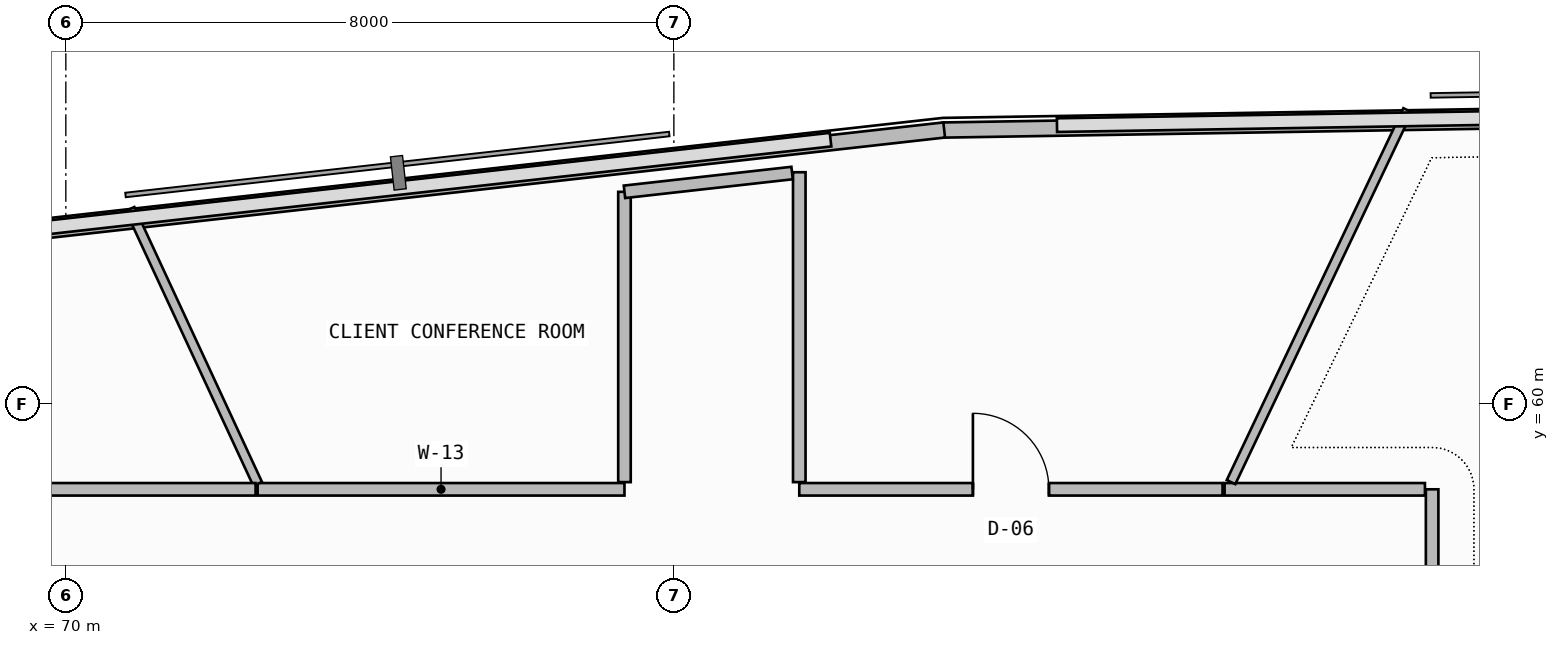
"""IFC4 building model, lengths in metres.
Left out: names, types, materials, properties, quantities, classifications, styles, units other than length and angle.
Written with IfcOpenShell. Run it as: python <this file> out.ifc"""

import sys

from ifc_helpers import new_model, si_unit, direction, frame, frame_2d, origin, place, context, subcontext, project, spatial, rectangle, extrude, element, fill, save


model = new_model("IFC4")
c1 = context("Model", 3, precision=1e-05, world=origin(), true_north=direction((0.0, 1.0)))
c2 = subcontext(c1, "Body", "Model", "MODEL_VIEW")
j1 = project(units=[si_unit("LENGTHUNIT", "METRE"), si_unit("PLANEANGLEUNIT", "RADIAN")], contexts=[c1])
p1 = place(None, origin())
s1 = spatial("IfcSite", under=j1, at=p1, CompositionType="ELEMENT")
p2 = place(p1, origin())
s2 = spatial("IfcBuilding", under=s1, at=p2, CompositionType="ELEMENT")
p3 = place(p2, frame((0.0, 0.0, 271.3)))
s3 = spatial("IfcBuildingStorey", under=s2, at=p3, CompositionType="ELEMENT", Elevation=271.3)
p4 = place(p3, frame((111.271, 64.092, 0.0), z_axis=(0.0, 0.0, 1.0), x_axis=(-0.999864741935, -0.016446818413, 0.0)))
e1 = element("IfcWall", 1, at=p4, inside=s3, PredefinedType="PARAPET", context=c2, shape_type="SweptSolid", body=[
    extrude(rectangle(XDim=29.733, YDim=0.2, at=frame_2d((14.866, 0.0))), origin(), (0.0, 0.0, 1.0), 1.15),
])
p5 = place(p3, frame((81.557, 63.604, 0.0), z_axis=(0.0, 0.0, 1.0), x_axis=(-0.993776455024, -0.111392806945, 0.0)))
e2 = element("IfcWall", 2, at=p5, inside=s3, PredefinedType="PARAPET", context=c2, shape_type="SweptSolid", body=[
    extrude(rectangle(XDim=24.891, YDim=0.2, at=frame_2d((12.446, 0.0))), origin(), (0.0, 0.0, 1.0), 1.15),
])
p6 = place(p3, frame((108.575, 58.067, 0.0), z_axis=(0.0, 0.0, 1.0), x_axis=(-0.923597614344, -0.383363335203, 0.0)))
e3 = element("IfcWall", 3, at=p6, inside=s3, PredefinedType="PARTITIONING", context=c2, shape_type="SweptSolid", body=[
    extrude(rectangle(XDim=22.201, YDim=0.125, at=frame_2d((11.101, 0.0))), origin(), (0.0, 0.0, 1.0), 2.645),
])
p7 = place(p3, frame((88.027, 51.309, 0.0), z_axis=(0.0, 0.0, 1.0), x_axis=(0.846577402355, 0.532265630885, 0.0)))
e4 = element("IfcWall", 4, at=p7, inside=s3, PredefinedType="PARTITIONING", context=c2, shape_type="SweptSolid", body=[
    extrude(rectangle(XDim=24.232, YDim=0.125, at=frame_2d((12.116, 0.0))), origin(), (0.0, 0.0, 1.0), 2.645),
])
p8 = place(p3, frame((87.976, 51.337, 0.0), z_axis=(0.0, 0.0, 1.0), x_axis=(0.0, 1.0, 0.0)))
e5 = element("IfcWall", 5, at=p8, inside=s3, PredefinedType="PARTITIONING", context=c2, shape_type="SweptSolid", body=[
    extrude(rectangle(XDim=7.539, YDim=0.165, at=frame_2d((3.77, 0.0))), origin(), (0.0, 0.0, 1.0), 2.745),
])
p9 = place(p8, frame((2.349, 0.0, 0.0)))
e6 = element("IfcOpeningElement", 6, at=p9, cuts=e5, PredefinedType="OPENING", context=c2, shape_type="SweptSolid", body=[
    extrude(rectangle(XDim=1.0, YDim=2.2, at=frame_2d((0.5, 1.1))), frame((0.0, 0.093, 0.0), z_axis=(0.0, -1.0, 0.0), x_axis=(1.0, 0.0, 0.0)), (0.0, 0.0, 1.0), 0.185),
])
p10 = place(p3, frame((87.882, 58.876, 0.0), z_axis=(0.0, 0.0, 1.0), x_axis=(-1.0, 0.0, 0.0)))
e7 = element("IfcWall", 7, at=p10, inside=s3, PredefinedType="PARTITIONING", context=c2, shape_type="SweptSolid", body=[
    extrude(rectangle(XDim=2.636, YDim=0.165, at=frame_2d((1.318, 0.0))), origin(), (0.0, 0.0, 1.0), 2.745),
])
p11 = place(p3, frame((85.331, 58.971, 0.0), z_axis=(0.0, 0.0, 1.0), x_axis=(0.429074283855, 0.903269206236, 0.0)))
e8 = element("IfcWall", 8, at=p11, inside=s3, PredefinedType="PARTITIONING", context=c2, shape_type="SweptSolid", body=[
    extrude(rectangle(XDim=5.416, YDim=0.125, at=frame_2d((2.708, 0.0))), origin(), (0.0, 0.0, 1.0), 3.26),
])
p12 = place(p3, frame((85.219, 58.876, 0.0), z_axis=(0.0, 0.0, 1.0), x_axis=(-1.0, 0.0, 0.0)))
e9 = element("IfcWall", 9, at=p12, inside=s3, PredefinedType="PARTITIONING", context=c2, shape_type="SweptSolid", body=[
    extrude(rectangle(XDim=5.569, YDim=0.165, at=frame_2d((2.785, 0.0))), origin(), (0.0, 0.0, 1.0), 3.26),
])
p13 = place(p12, frame((2.284, 0.0, 0.0)))
e10 = element("IfcOpeningElement", 10, at=p13, cuts=e9, PredefinedType="OPENING", context=c2, shape_type="SweptSolid", body=[
    extrude(rectangle(XDim=1.0, YDim=2.2, at=frame_2d((0.5, 1.1))), frame((0.0, 0.093, 0.0), z_axis=(0.0, -1.0, 0.0), x_axis=(1.0, 0.0, 0.0)), (0.0, 0.0, 1.0), 0.185),
])
p14 = place(p3, frame((77.35, 58.876, 0.0), z_axis=(0.0, 0.0, 1.0), x_axis=(-1.0, 0.0, 0.0)))
e11 = element("IfcWall", 11, at=p14, inside=s3, PredefinedType="PARTITIONING", context=c2, shape_type="SweptSolid", body=[
    extrude(rectangle(XDim=4.827, YDim=0.165, at=frame_2d((2.413, 0.0))), origin(), (0.0, 0.0, 1.0), 3.26),
])
p15 = place(p3, frame((79.65, 58.971, 0.0), z_axis=(0.0, 0.0, 1.0), x_axis=(0.0, 1.0, 0.0)))
e12 = element("IfcWall", 12, at=p15, inside=s3, PredefinedType="PARTITIONING", context=c2, shape_type="SweptSolid", body=[
    extrude(rectangle(XDim=4.077, YDim=0.165, at=frame_2d((2.039, 0.0))), origin(), (0.0, 0.0, 1.0), 3.26),
])
p16 = place(p3, frame((77.35, 62.79, 0.0), z_axis=(0.0, 0.0, 1.0), x_axis=(0.0, -1.0, 0.0)))
e13 = element("IfcWall", 13, at=p16, inside=s3, PredefinedType="PARTITIONING", context=c2, shape_type="SweptSolid", body=[
    extrude(rectangle(XDim=3.819, YDim=0.165, at=frame_2d((1.91, 0.0))), origin(), (0.0, 0.0, 1.0), 3.26),
])
p17 = place(p3, frame((79.555, 63.037, 0.0), z_axis=(0.0, 0.0, 1.0), x_axis=(-0.993770518254, -0.11144575833, 0.0)))
e14 = element("IfcWall", 14, at=p17, inside=s3, PredefinedType="PARTITIONING", context=c2, shape_type="SweptSolid", body=[
    extrude(rectangle(XDim=2.219, YDim=0.165, at=frame_2d((1.11, 0.0))), origin(), (0.0, 0.0, 1.0), 3.26),
])
p18 = place(p3, frame((72.523, 58.948, 0.0), z_axis=(0.0, 0.0, 1.0), x_axis=(-0.421033933963, 0.90704488668, 0.0)))
e15 = element("IfcWall", 15, at=p18, inside=s3, PredefinedType="PARTITIONING", context=c2, shape_type="SweptSolid", body=[
    extrude(rectangle(XDim=3.987, YDim=0.125, at=frame_2d((1.993, 0.0))), origin(), (0.0, 0.0, 1.0), 3.26),
])
p19 = place(p3, frame((72.497, 58.876, 0.0), z_axis=(0.0, 0.0, 1.0), x_axis=(-1.0, 0.0, 0.0)))
e16 = element("IfcWall", 16, at=p19, inside=s3, PredefinedType="PARTITIONING", context=c2, shape_type="SweptSolid", body=[
    extrude(rectangle(XDim=2.829, YDim=0.165, at=frame_2d((1.414, 0.0))), origin(), (0.0, 0.0, 1.0), 3.26),
])
p20 = place(p13, frame((1.0, 0.0, 0.0), z_axis=(0.0, 0.0, 1.0), x_axis=(-1.0, 0.0, 0.0)))
e17 = element("IfcDoor", 17, at=p20, inside=s3, OperationType="SINGLE_SWING_LEFT", PredefinedType="DOOR", context=c2, shape_type="SweptSolid", body=[
    extrude(rectangle(XDim=1.0, YDim=2.2, at=frame_2d((0.5, 1.1))), frame((0.0, 0.025, 0.0), z_axis=(0.0, -1.0, 0.0), x_axis=(1.0, 0.0, 0.0)), (0.0, 0.0, 1.0), 0.05),
])
fill(e10, e17)
save(model, sys.argv[1])
